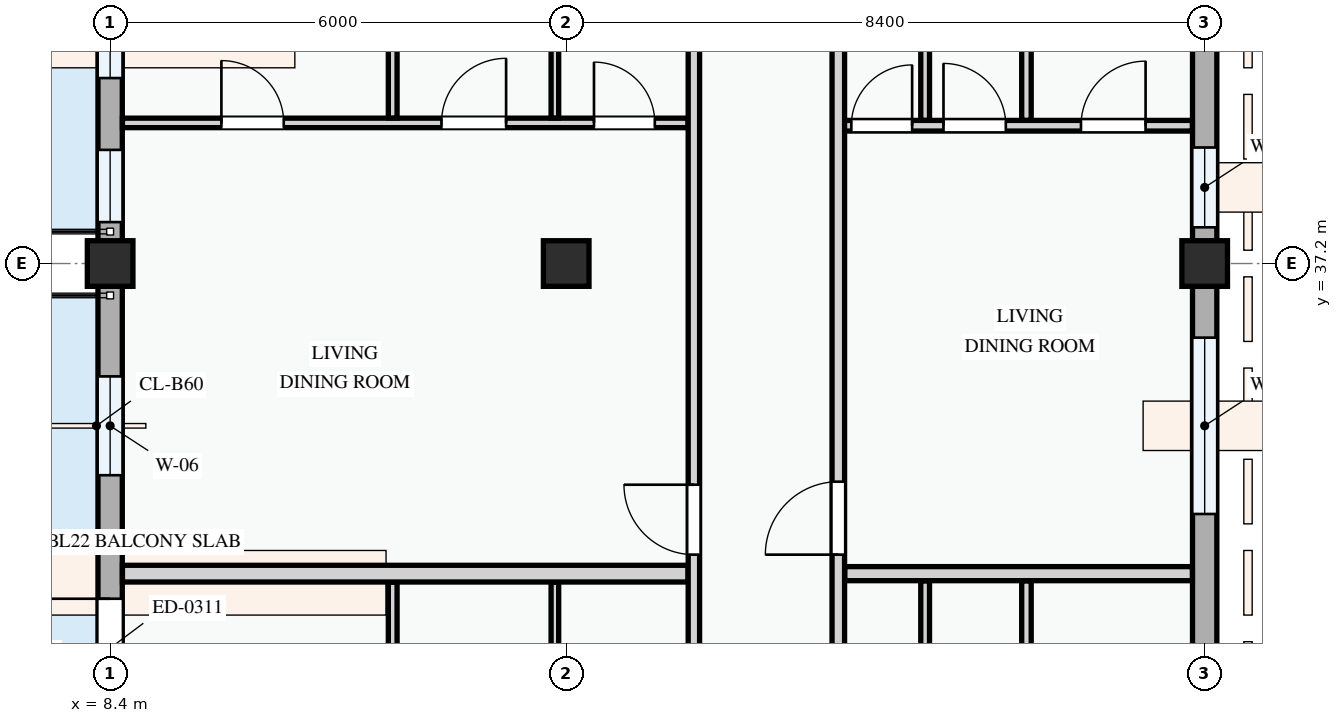
"""IFC4 building model, lengths in metres.
Left out: names, types, materials, properties, quantities, classifications, styles, units other than length and angle.
Written with IfcOpenShell. Run it as: python <this file> out.ifc"""

import sys

from ifc_helpers import new_model, si_unit, direction, frame, frame_2d, origin, origin_2d, place, context, subcontext, project, spatial, rectangle, extrude, element, fill, save


model = new_model("IFC4")
c1 = context("Model", 3, precision=1e-05, world=origin(), true_north=direction((0.0, 1.0)))
c2 = subcontext(c1, "Body", "Model", "MODEL_VIEW")
j1 = project(units=[si_unit("LENGTHUNIT", "METRE"), si_unit("PLANEANGLEUNIT", "RADIAN")], contexts=[c1])
p1 = place(None, origin())
s1 = spatial("IfcSite", under=j1, at=p1, CompositionType="ELEMENT")
p2 = place(p1, origin())
s2 = spatial("IfcBuilding", under=s1, at=p2, CompositionType="ELEMENT")
p3 = place(p2, frame((0.0, 0.0, 14.7)))
s3 = spatial("IfcBuildingStorey", under=s2, at=p3, CompositionType="ELEMENT", Elevation=14.7)
for number, where, z_axis, x_axis in (
    (1, (8.4, 37.2, 0.0), (0.0, 0.0, 1.0), (1.0, 0.0, 0.0)),
    (2, (14.4, 37.2, 0.0), (0.0, 0.0, 1.0), (1.0, 0.0, 0.0)),
    (3, (22.8, 37.2, 0.0), (0.0, 0.0, 1.0), (1.0, 0.0, 0.0)),
):
    element("IfcColumn", number, at=place(p3, frame(where, z_axis=z_axis, x_axis=x_axis)), inside=s3, PredefinedType="COLUMN", context=c2, shape_type="SweptSolid", body=[
        extrude(rectangle(XDim=0.6, YDim=0.6, at=origin_2d()), origin(), (0.0, 0.0, 1.0), 3.3),
    ])
p4 = place(p3, frame((22.8, 28.8, 0.0), z_axis=(0.0, 0.0, 1.0), x_axis=(0.0, 1.0, 0.0)))
e4 = element("IfcWall", 4, at=p4, inside=s3, PredefinedType="STANDARD", context=c2, shape_type="SweptSolid", body=[
    extrude(rectangle(XDim=8.4, YDim=0.32, at=frame_2d((4.2, 0.0))), origin(), (0.0, 0.0, 1.0), 2.425),
])
p5 = place(p4, frame((1.215, 0.0, 0.78)))
e5 = element("IfcOpeningElement", 5, at=p5, cuts=e4, PredefinedType="OPENING", context=c2, shape_type="SweptSolid", body=[
    extrude(rectangle(XDim=2.08, YDim=1.52, at=frame_2d((1.04, 0.76))), frame((0.0, 0.17, 0.0), z_axis=(0.0, -1.0, 0.0), x_axis=(1.0, 0.0, 0.0)), (0.0, 0.0, 1.0), 0.34),
])
p6 = place(p4, frame((5.105, 0.0, 0.78)))
e6 = element("IfcOpeningElement", 6, at=p6, cuts=e4, PredefinedType="OPENING", context=c2, shape_type="SweptSolid", body=[
    extrude(rectangle(XDim=2.32, YDim=1.5, at=frame_2d((1.16, 0.75))), frame((0.0, 0.17, 0.0), z_axis=(0.0, -1.0, 0.0), x_axis=(1.0, 0.0, 0.0)), (0.0, 0.0, 1.0), 0.34),
])
p7 = place(p3, frame((22.8, 37.2, 0.0), z_axis=(0.0, 0.0, 1.0), x_axis=(0.0, 1.0, 0.0)))
e7 = element("IfcWall", 7, at=p7, inside=s3, PredefinedType="STANDARD", context=c2, shape_type="SweptSolid", body=[
    extrude(rectangle(XDim=6.0, YDim=0.32, at=frame_2d((3.0, 0.0))), origin(), (0.0, 0.0, 1.0), 2.575),
])
p8 = place(p7, frame((0.476, 0.0, 0.78)))
e8 = element("IfcOpeningElement", 8, at=p8, cuts=e7, PredefinedType="OPENING", context=c2, shape_type="SweptSolid", body=[
    extrude(rectangle(XDim=1.05, YDim=1.2, at=frame_2d((0.525, 0.6))), frame((0.0, 0.17, 0.0), z_axis=(0.0, -1.0, 0.0), x_axis=(1.0, 0.0, 0.0)), (0.0, 0.0, 1.0), 0.34),
])
p9 = place(p7, frame((3.001, 0.0, 0.78)))
e9 = element("IfcOpeningElement", 9, at=p9, cuts=e7, PredefinedType="OPENING", context=c2, shape_type="SweptSolid", body=[
    extrude(rectangle(XDim=1.62, YDim=1.38, at=frame_2d((0.81, 0.69))), frame((0.0, 0.17, 0.0), z_axis=(0.0, -1.0, 0.0), x_axis=(1.0, 0.0, 0.0)), (0.0, 0.0, 1.0), 0.34),
])
p10 = place(p3, frame((8.4, 43.2, 0.0), z_axis=(0.0, 0.0, 1.0), x_axis=(0.0, -1.0, 0.0)))
e10 = element("IfcWall", 10, at=p10, inside=s3, PredefinedType="STANDARD", context=c2, shape_type="SweptSolid", body=[
    extrude(rectangle(XDim=6.0, YDim=0.32, at=frame_2d((3.0, 0.0))), origin(), (0.0, 0.0, 1.0), 2.445),
])
p11 = place(p10, frame((0.62, 0.0, 0.0)))
e11 = element("IfcOpeningElement", 11, at=p11, cuts=e10, PredefinedType="OPENING", context=c2, shape_type="SweptSolid", body=[
    extrude(rectangle(XDim=1.25, YDim=2.2, at=frame_2d((0.625, 1.1))), frame((0.0, 0.17, 0.0), z_axis=(0.0, -1.0, 0.0), x_axis=(1.0, 0.0, 0.0)), (0.0, 0.0, 1.0), 0.34),
])
p12 = place(p10, frame((2.51, 0.0, 0.78)))
e12 = element("IfcOpeningElement", 12, at=p12, cuts=e10, PredefinedType="OPENING", context=c2, shape_type="SweptSolid", body=[
    extrude(rectangle(XDim=1.05, YDim=1.2, at=frame_2d((0.525, 0.6))), frame((0.0, 0.17, 0.0), z_axis=(0.0, -1.0, 0.0), x_axis=(1.0, 0.0, 0.0)), (0.0, 0.0, 1.0), 0.34),
])
p13 = place(p10, frame((4.505, 0.0, 0.78)))
e13 = element("IfcOpeningElement", 13, at=p13, cuts=e10, PredefinedType="OPENING", context=c2, shape_type="SweptSolid", body=[
    extrude(rectangle(XDim=0.95, YDim=1.15, at=frame_2d((0.475, 0.575))), frame((0.0, 0.17, 0.0), z_axis=(0.0, -1.0, 0.0), x_axis=(1.0, 0.0, 0.0)), (0.0, 0.0, 1.0), 0.34),
])
p14 = place(p3, frame((8.4, 37.2, 0.0), z_axis=(0.0, 0.0, 1.0), x_axis=(0.0, -1.0, 0.0)))
e14 = element("IfcWall", 14, at=p14, inside=s3, PredefinedType="STANDARD", context=c2, shape_type="SweptSolid", body=[
    extrude(rectangle(XDim=8.4, YDim=0.32, at=frame_2d((4.2, 0.0))), origin(), (0.0, 0.0, 1.0), 2.345),
])
p15 = place(p14, frame((4.41, 0.0, 0.0)))
e15 = element("IfcOpeningElement", 15, at=p15, cuts=e14, PredefinedType="OPENING", context=c2, shape_type="SweptSolid", body=[
    extrude(rectangle(XDim=1.3, YDim=2.15, at=frame_2d((0.65, 1.075))), frame((0.0, 0.17, 0.0), z_axis=(0.0, -1.0, 0.0), x_axis=(1.0, 0.0, 0.0)), (0.0, 0.0, 1.0), 0.34),
])
p16 = place(p14, frame((1.485, 0.0, 0.78)))
e16 = element("IfcOpeningElement", 16, at=p16, cuts=e14, PredefinedType="OPENING", context=c2, shape_type="SweptSolid", body=[
    extrude(rectangle(XDim=1.3, YDim=1.4, at=frame_2d((0.65, 0.7))), frame((0.0, 0.17, 0.0), z_axis=(0.0, -1.0, 0.0), x_axis=(1.0, 0.0, 0.0)), (0.0, 0.0, 1.0), 0.34),
])
p17 = place(p14, frame((6.41, 0.0, 0.78)))
e17 = element("IfcOpeningElement", 17, at=p17, cuts=e14, PredefinedType="OPENING", context=c2, shape_type="SweptSolid", body=[
    extrude(rectangle(XDim=1.15, YDim=1.25, at=frame_2d((0.575, 0.625))), frame((0.0, 0.17, 0.0), z_axis=(0.0, -1.0, 0.0), x_axis=(1.0, 0.0, 0.0)), (0.0, 0.0, 1.0), 0.34),
])
p18 = place(p3, frame((12.118, 27.054, 0.0), z_axis=(0.0, 0.0, 1.0), x_axis=(0.0, 1.0, 0.0)))
e18 = element("IfcWall", 18, at=p18, inside=s3, PredefinedType="PARTITIONING", context=c2, shape_type="SweptSolid", body=[
    extrude(rectangle(XDim=5.954, YDim=0.115, at=frame_2d((2.977, 0.0))), origin(), (0.0, 0.0, 1.0), 3.0),
])
p19 = place(p3, frame((14.251, 27.054, 0.0), z_axis=(0.0, 0.0, 1.0), x_axis=(0.0, 1.0, 0.0)))
e19 = element("IfcWall", 19, at=p19, inside=s3, PredefinedType="PARTITIONING", context=c2, shape_type="SweptSolid", body=[
    extrude(rectangle(XDim=5.954, YDim=0.1, at=frame_2d((2.977, 0.0))), origin(), (0.0, 0.0, 1.0), 2.425),
])
p20 = place(p3, frame((20.455, 27.053, 0.0), z_axis=(0.0, 0.0, 1.0), x_axis=(0.0, 1.0, 0.0)))
e20 = element("IfcWall", 20, at=p20, inside=s3, PredefinedType="PARTITIONING", context=c2, shape_type="SweptSolid", body=[
    extrude(rectangle(XDim=5.973, YDim=0.125, at=frame_2d((2.986, 0.0))), origin(), (0.0, 0.0, 1.0), 3.0),
])
p21 = place(p3, frame((19.122, 27.053, 0.0), z_axis=(0.0, 0.0, 1.0), x_axis=(0.0, 1.0, 0.0)))
e21 = element("IfcWall", 21, at=p21, inside=s3, PredefinedType="PARTITIONING", context=c2, shape_type="SweptSolid", body=[
    extrude(rectangle(XDim=5.973, YDim=0.115, at=frame_2d((2.986, 0.0))), origin(), (0.0, 0.0, 1.0), 3.0),
])
p22 = place(p3, frame((8.562, 39.05, 0.0), z_axis=(0.0, 0.0, 1.0), x_axis=(1.0, 0.0, 0.0)))
e22 = element("IfcWall", 22, at=p22, inside=s3, PredefinedType="PARTITIONING", context=c2, shape_type="SweptSolid", body=[
    extrude(rectangle(XDim=7.441, YDim=0.125, at=frame_2d((3.72, 0.0))), origin(), (0.0, 0.0, 1.0), 3.0),
])
p23 = place(p22, frame((1.302, 0.0, 0.0)))
e23 = element("IfcOpeningElement", 23, at=p23, cuts=e22, PredefinedType="OPENING", context=c2, shape_type="SweptSolid", body=[
    extrude(rectangle(XDim=0.82, YDim=2.08, at=frame_2d((0.41, 1.04))), frame((0.0, 0.073, 0.0), z_axis=(0.0, -1.0, 0.0), x_axis=(1.0, 0.0, 0.0)), (0.0, 0.0, 1.0), 0.145),
])
p24 = place(p22, frame((4.198, 0.0, 0.0)))
e24 = element("IfcOpeningElement", 24, at=p24, cuts=e22, PredefinedType="OPENING", context=c2, shape_type="SweptSolid", body=[
    extrude(rectangle(XDim=0.85, YDim=2.1, at=frame_2d((0.425, 1.05))), frame((0.0, 0.073, 0.0), z_axis=(0.0, -1.0, 0.0), x_axis=(1.0, 0.0, 0.0)), (0.0, 0.0, 1.0), 0.145),
])
p25 = place(p22, frame((6.204, 0.0, 0.0)))
e25 = element("IfcOpeningElement", 25, at=p25, cuts=e22, PredefinedType="OPENING", context=c2, shape_type="SweptSolid", body=[
    extrude(rectangle(XDim=0.8, YDim=2.1, at=frame_2d((0.4, 1.05))), frame((0.0, 0.073, 0.0), z_axis=(0.0, -1.0, 0.0), x_axis=(1.0, 0.0, 0.0)), (0.0, 0.0, 1.0), 0.145),
])
p26 = place(p3, frame((12.118, 39.115, 0.0), z_axis=(0.0, 0.0, 1.0), x_axis=(0.0, 1.0, 0.0)))
e26 = element("IfcWall", 26, at=p26, inside=s3, PredefinedType="PARTITIONING", context=c2, shape_type="SweptSolid", body=[
    extrude(rectangle(XDim=5.763, YDim=0.115, at=frame_2d((2.882, 0.0))), origin(), (0.0, 0.0, 1.0), 3.0),
])
p27 = place(p3, frame((14.251, 39.115, 0.0), z_axis=(0.0, 0.0, 1.0), x_axis=(0.0, 1.0, 0.0)))
e27 = element("IfcWall", 27, at=p27, inside=s3, PredefinedType="PARTITIONING", context=c2, shape_type="SweptSolid", body=[
    extrude(rectangle(XDim=5.763, YDim=0.1, at=frame_2d((2.882, 0.0))), origin(), (0.0, 0.0, 1.0), 2.425),
])
p28 = place(p3, frame((17.98, 39.013, 0.0), z_axis=(0.0, 0.0, 1.0), x_axis=(1.0, 0.0, 0.0)))
e28 = element("IfcWall", 28, at=p28, inside=s3, PredefinedType="PARTITIONING", context=c2, shape_type="SweptSolid", body=[
    extrude(rectangle(XDim=4.658, YDim=0.14, at=frame_2d((2.329, 0.0))), origin(), (0.0, 0.0, 1.0), 3.0),
])
p29 = place(p28, frame((0.171, 0.0, 0.0)))
e29 = element("IfcOpeningElement", 29, at=p29, cuts=e28, PredefinedType="OPENING", context=c2, shape_type="SweptSolid", body=[
    extrude(rectangle(XDim=0.8, YDim=2.1, at=frame_2d((0.4, 1.05))), frame((0.0, 0.08, 0.0), z_axis=(0.0, -1.0, 0.0), x_axis=(1.0, 0.0, 0.0)), (0.0, 0.0, 1.0), 0.16),
])
p30 = place(p28, frame((1.384, 0.0, 0.0)))
e30 = element("IfcOpeningElement", 30, at=p30, cuts=e28, PredefinedType="OPENING", context=c2, shape_type="SweptSolid", body=[
    extrude(rectangle(XDim=0.82, YDim=2.08, at=frame_2d((0.41, 1.04))), frame((0.0, 0.08, 0.0), z_axis=(0.0, -1.0, 0.0), x_axis=(1.0, 0.0, 0.0)), (0.0, 0.0, 1.0), 0.16),
])
p31 = place(p28, frame((3.193, 0.0, 0.0)))
e31 = element("IfcOpeningElement", 31, at=p31, cuts=e28, PredefinedType="OPENING", context=c2, shape_type="SweptSolid", body=[
    extrude(rectangle(XDim=0.85, YDim=2.1, at=frame_2d((0.425, 1.05))), frame((0.0, 0.08, 0.0), z_axis=(0.0, -1.0, 0.0), x_axis=(1.0, 0.0, 0.0)), (0.0, 0.0, 1.0), 0.16),
])
p32 = place(p3, frame((20.455, 39.085, 0.0), z_axis=(0.0, 0.0, 1.0), x_axis=(0.0, 1.0, 0.0)))
e32 = element("IfcWall", 32, at=p32, inside=s3, PredefinedType="PARTITIONING", context=c2, shape_type="SweptSolid", body=[
    extrude(rectangle(XDim=5.783, YDim=0.125, at=frame_2d((2.892, 0.0))), origin(), (0.0, 0.0, 1.0), 3.0),
])
p33 = place(p3, frame((19.122, 39.085, 0.0), z_axis=(0.0, 0.0, 1.0), x_axis=(0.0, 1.0, 0.0)))
e33 = element("IfcWall", 33, at=p33, inside=s3, PredefinedType="PARTITIONING", context=c2, shape_type="SweptSolid", body=[
    extrude(rectangle(XDim=5.783, YDim=0.115, at=frame_2d((2.892, 0.0))), origin(), (0.0, 0.0, 1.0), 3.0),
])
p34 = place(p3, frame((8.562, 33.12, 0.0), z_axis=(0.0, 0.0, 1.0), x_axis=(1.0, 0.0, 0.0)))
e34 = element("IfcWall", 34, at=p34, inside=s3, PredefinedType="PARTITIONING", context=c2, shape_type="SweptSolid", body=[
    extrude(rectangle(XDim=7.441, YDim=0.22, at=frame_2d((3.72, 0.0))), origin(), (0.0, 0.0, 1.0), 3.0),
])
p35 = place(p3, frame((18.064, 33.12, 0.0), z_axis=(0.0, 0.0, 1.0), x_axis=(1.0, 0.0, 0.0)))
e35 = element("IfcWall", 35, at=p35, inside=s3, PredefinedType="PARTITIONING", context=c2, shape_type="SweptSolid", body=[
    extrude(rectangle(XDim=4.573, YDim=0.185, at=frame_2d((2.287, 0.0))), origin(), (0.0, 0.0, 1.0), 3.0),
])
p36 = place(p3, frame((16.08, 22.66, 0.0), z_axis=(0.0, 0.0, 1.0), x_axis=(0.0, 1.0, 0.0)))
e36 = element("IfcWall", 36, at=p36, inside=s3, PredefinedType="PARTITIONING", context=c2, shape_type="SweptSolid", body=[
    extrude(rectangle(XDim=34.778, YDim=0.15, at=frame_2d((17.389, 0.0))), origin(), (0.0, 0.0, 1.0), 3.0),
])
p37 = place(p36, frame((2.672, 0.0, 0.0)))
e37 = element("IfcOpeningElement", 37, at=p37, cuts=e36, PredefinedType="OPENING", context=c2, shape_type="SweptSolid", body=[
    extrude(rectangle(XDim=0.92, YDim=2.1, at=frame_2d((0.46, 1.05))), frame((0.0, 0.085, 0.0), z_axis=(0.0, -1.0, 0.0), x_axis=(1.0, 0.0, 0.0)), (0.0, 0.0, 1.0), 0.17),
])
p38 = place(p36, frame((10.71, 0.0, 0.0)))
e38 = element("IfcOpeningElement", 38, at=p38, cuts=e36, PredefinedType="OPENING", context=c2, shape_type="SweptSolid", body=[
    extrude(rectangle(XDim=0.92, YDim=2.1, at=frame_2d((0.46, 1.05))), frame((0.0, 0.085, 0.0), z_axis=(0.0, -1.0, 0.0), x_axis=(1.0, 0.0, 0.0)), (0.0, 0.0, 1.0), 0.17),
])
p39 = place(p36, frame((24.28, 0.0, 0.0)))
e39 = element("IfcOpeningElement", 39, at=p39, cuts=e36, PredefinedType="OPENING", context=c2, shape_type="SweptSolid", body=[
    extrude(rectangle(XDim=0.92, YDim=2.1, at=frame_2d((0.46, 1.05))), frame((0.0, 0.085, 0.0), z_axis=(0.0, -1.0, 0.0), x_axis=(1.0, 0.0, 0.0)), (0.0, 0.0, 1.0), 0.17),
])
p40 = place(p3, frame((17.98, 22.66, 0.0), z_axis=(0.0, 0.0, 1.0), x_axis=(0.0, 1.0, 0.0)))
e40 = element("IfcWall", 40, at=p40, inside=s3, PredefinedType="PARTITIONING", context=c2, shape_type="SweptSolid", body=[
    extrude(rectangle(XDim=34.778, YDim=0.165, at=frame_2d((17.389, 0.0))), origin(), (0.0, 0.0, 1.0), 3.0),
])
p41 = place(p40, frame((2.664, 0.0, 0.0)))
e41 = element("IfcOpeningElement", 41, at=p41, cuts=e40, PredefinedType="OPENING", context=c2, shape_type="SweptSolid", body=[
    extrude(rectangle(XDim=0.92, YDim=2.1, at=frame_2d((0.46, 1.05))), frame((0.0, 0.093, 0.0), z_axis=(0.0, -1.0, 0.0), x_axis=(1.0, 0.0, 0.0)), (0.0, 0.0, 1.0), 0.185),
])
p42 = place(p40, frame((10.71, 0.0, 0.0)))
e42 = element("IfcOpeningElement", 42, at=p42, cuts=e40, PredefinedType="OPENING", context=c2, shape_type="SweptSolid", body=[
    extrude(rectangle(XDim=0.96, YDim=2.12, at=frame_2d((0.48, 1.06))), frame((0.0, 0.093, 0.0), z_axis=(0.0, -1.0, 0.0), x_axis=(1.0, 0.0, 0.0)), (0.0, 0.0, 1.0), 0.185),
])
p43 = place(p40, frame((24.254, 0.0, 0.0)))
e43 = element("IfcOpeningElement", 43, at=p43, cuts=e40, PredefinedType="OPENING", context=c2, shape_type="SweptSolid", body=[
    extrude(rectangle(XDim=0.92, YDim=2.1, at=frame_2d((0.46, 1.05))), frame((0.0, 0.093, 0.0), z_axis=(0.0, -1.0, 0.0), x_axis=(1.0, 0.0, 0.0)), (0.0, 0.0, 1.0), 0.185),
])
p44 = place(p6, origin())
e44 = element("IfcWindow", 44, at=p44, inside=s3, PartitioningType="DOUBLE_PANEL_VERTICAL", PredefinedType="WINDOW", context=c2, shape_type="SweptSolid", body=[
    extrude(rectangle(XDim=2.32, YDim=1.5, at=frame_2d((1.16, 0.75))), frame((0.0, 0.03, 0.0), z_axis=(0.0, -1.0, 0.0), x_axis=(1.0, 0.0, 0.0)), (0.0, 0.0, 1.0), 0.06),
])
fill(e6, e44)
p45 = place(p8, origin())
e45 = element("IfcWindow", 45, at=p45, inside=s3, PartitioningType="SINGLE_PANEL", PredefinedType="WINDOW", context=c2, shape_type="SweptSolid", body=[
    extrude(rectangle(XDim=1.05, YDim=1.2, at=frame_2d((0.525, 0.6))), frame((0.0, 0.03, 0.0), z_axis=(0.0, -1.0, 0.0), x_axis=(1.0, 0.0, 0.0)), (0.0, 0.0, 1.0), 0.06),
])
fill(e8, e45)
p46 = place(p12, origin())
e46 = element("IfcWindow", 46, at=p46, inside=s3, PartitioningType="SINGLE_PANEL", PredefinedType="WINDOW", context=c2, shape_type="SweptSolid", body=[
    extrude(rectangle(XDim=1.05, YDim=1.2, at=frame_2d((0.525, 0.6))), frame((0.0, 0.03, 0.0), z_axis=(0.0, -1.0, 0.0), x_axis=(1.0, 0.0, 0.0)), (0.0, 0.0, 1.0), 0.06),
])
fill(e12, e46)
p47 = place(p13, origin())
e47 = element("IfcWindow", 47, at=p47, inside=s3, PartitioningType="SINGLE_PANEL", PredefinedType="WINDOW", context=c2, shape_type="SweptSolid", body=[
    extrude(rectangle(XDim=0.95, YDim=1.15, at=frame_2d((0.475, 0.575))), frame((0.0, 0.03, 0.0), z_axis=(0.0, -1.0, 0.0), x_axis=(1.0, 0.0, 0.0)), (0.0, 0.0, 1.0), 0.06),
])
fill(e13, e47)
p48 = place(p15, frame((1.3, 0.0, 0.0), z_axis=(0.0, 0.0, 1.0), x_axis=(-1.0, 0.0, 0.0)))
e48 = element("IfcDoor", 48, at=p48, inside=s3, OperationType="SINGLE_SWING_RIGHT", PredefinedType="DOOR", context=c2, shape_type="SweptSolid", body=[
    extrude(rectangle(XDim=1.3, YDim=2.15, at=frame_2d((0.65, 1.075))), frame((0.0, 0.025, 0.0), z_axis=(0.0, -1.0, 0.0), x_axis=(1.0, 0.0, 0.0)), (0.0, 0.0, 1.0), 0.05),
])
fill(e15, e48)
p49 = place(p16, origin())
e49 = element("IfcWindow", 49, at=p49, inside=s3, PartitioningType="SINGLE_PANEL", PredefinedType="WINDOW", context=c2, shape_type="SweptSolid", body=[
    extrude(rectangle(XDim=1.3, YDim=1.4, at=frame_2d((0.65, 0.7))), frame((0.0, 0.03, 0.0), z_axis=(0.0, -1.0, 0.0), x_axis=(1.0, 0.0, 0.0)), (0.0, 0.0, 1.0), 0.06),
])
fill(e16, e49)
p50 = place(p23, origin())
e50 = element("IfcDoor", 50, at=p50, inside=s3, OperationType="SINGLE_SWING_LEFT", PredefinedType="DOOR", context=c2, shape_type="SweptSolid", body=[
    extrude(rectangle(XDim=0.82, YDim=2.08, at=frame_2d((0.41, 1.04))), frame((0.0, 0.025, 0.0), z_axis=(0.0, -1.0, 0.0), x_axis=(1.0, 0.0, 0.0)), (0.0, 0.0, 1.0), 0.05),
])
fill(e23, e50)
p51 = place(p24, origin())
e51 = element("IfcDoor", 51, at=p51, inside=s3, OperationType="SINGLE_SWING_RIGHT", PredefinedType="DOOR", context=c2, shape_type="SweptSolid", body=[
    extrude(rectangle(XDim=0.85, YDim=2.1, at=frame_2d((0.425, 1.05))), frame((0.0, 0.025, 0.0), z_axis=(0.0, -1.0, 0.0), x_axis=(1.0, 0.0, 0.0)), (0.0, 0.0, 1.0), 0.05),
])
fill(e24, e51)
p52 = place(p25, origin())
e52 = element("IfcDoor", 52, at=p52, inside=s3, OperationType="SINGLE_SWING_LEFT", PredefinedType="DOOR", context=c2, shape_type="SweptSolid", body=[
    extrude(rectangle(XDim=0.8, YDim=2.1, at=frame_2d((0.4, 1.05))), frame((0.0, 0.025, 0.0), z_axis=(0.0, -1.0, 0.0), x_axis=(1.0, 0.0, 0.0)), (0.0, 0.0, 1.0), 0.05),
])
fill(e25, e52)
p53 = place(p29, origin())
e53 = element("IfcDoor", 53, at=p53, inside=s3, OperationType="SINGLE_SWING_RIGHT", PredefinedType="DOOR", context=c2, shape_type="SweptSolid", body=[
    extrude(rectangle(XDim=0.8, YDim=2.1, at=frame_2d((0.4, 1.05))), frame((0.0, 0.025, 0.0), z_axis=(0.0, -1.0, 0.0), x_axis=(1.0, 0.0, 0.0)), (0.0, 0.0, 1.0), 0.05),
])
fill(e29, e53)
p54 = place(p30, origin())
e54 = element("IfcDoor", 54, at=p54, inside=s3, OperationType="SINGLE_SWING_LEFT", PredefinedType="DOOR", context=c2, shape_type="SweptSolid", body=[
    extrude(rectangle(XDim=0.82, YDim=2.08, at=frame_2d((0.41, 1.04))), frame((0.0, 0.025, 0.0), z_axis=(0.0, -1.0, 0.0), x_axis=(1.0, 0.0, 0.0)), (0.0, 0.0, 1.0), 0.05),
])
fill(e30, e54)
p55 = place(p31, origin())
e55 = element("IfcDoor", 55, at=p55, inside=s3, OperationType="SINGLE_SWING_RIGHT", PredefinedType="DOOR", context=c2, shape_type="SweptSolid", body=[
    extrude(rectangle(XDim=0.85, YDim=2.1, at=frame_2d((0.425, 1.05))), frame((0.0, 0.025, 0.0), z_axis=(0.0, -1.0, 0.0), x_axis=(1.0, 0.0, 0.0)), (0.0, 0.0, 1.0), 0.05),
])
fill(e31, e55)
p56 = place(p38, origin())
e56 = element("IfcDoor", 56, at=p56, inside=s3, OperationType="SINGLE_SWING_RIGHT", PredefinedType="DOOR", context=c2, shape_type="SweptSolid", body=[
    extrude(rectangle(XDim=0.92, YDim=2.1, at=frame_2d((0.46, 1.05))), frame((0.0, 0.025, 0.0), z_axis=(0.0, -1.0, 0.0), x_axis=(1.0, 0.0, 0.0)), (0.0, 0.0, 1.0), 0.05),
])
fill(e38, e56)
p57 = place(p42, origin())
e57 = element("IfcDoor", 57, at=p57, inside=s3, OperationType="SINGLE_SWING_LEFT", PredefinedType="DOOR", context=c2, shape_type="SweptSolid", body=[
    extrude(rectangle(XDim=0.96, YDim=2.12, at=frame_2d((0.48, 1.06))), frame((0.0, 0.025, 0.0), z_axis=(0.0, -1.0, 0.0), x_axis=(1.0, 0.0, 0.0)), (0.0, 0.0, 1.0), 0.05),
])
fill(e42, e57)
save(model, sys.argv[1])
